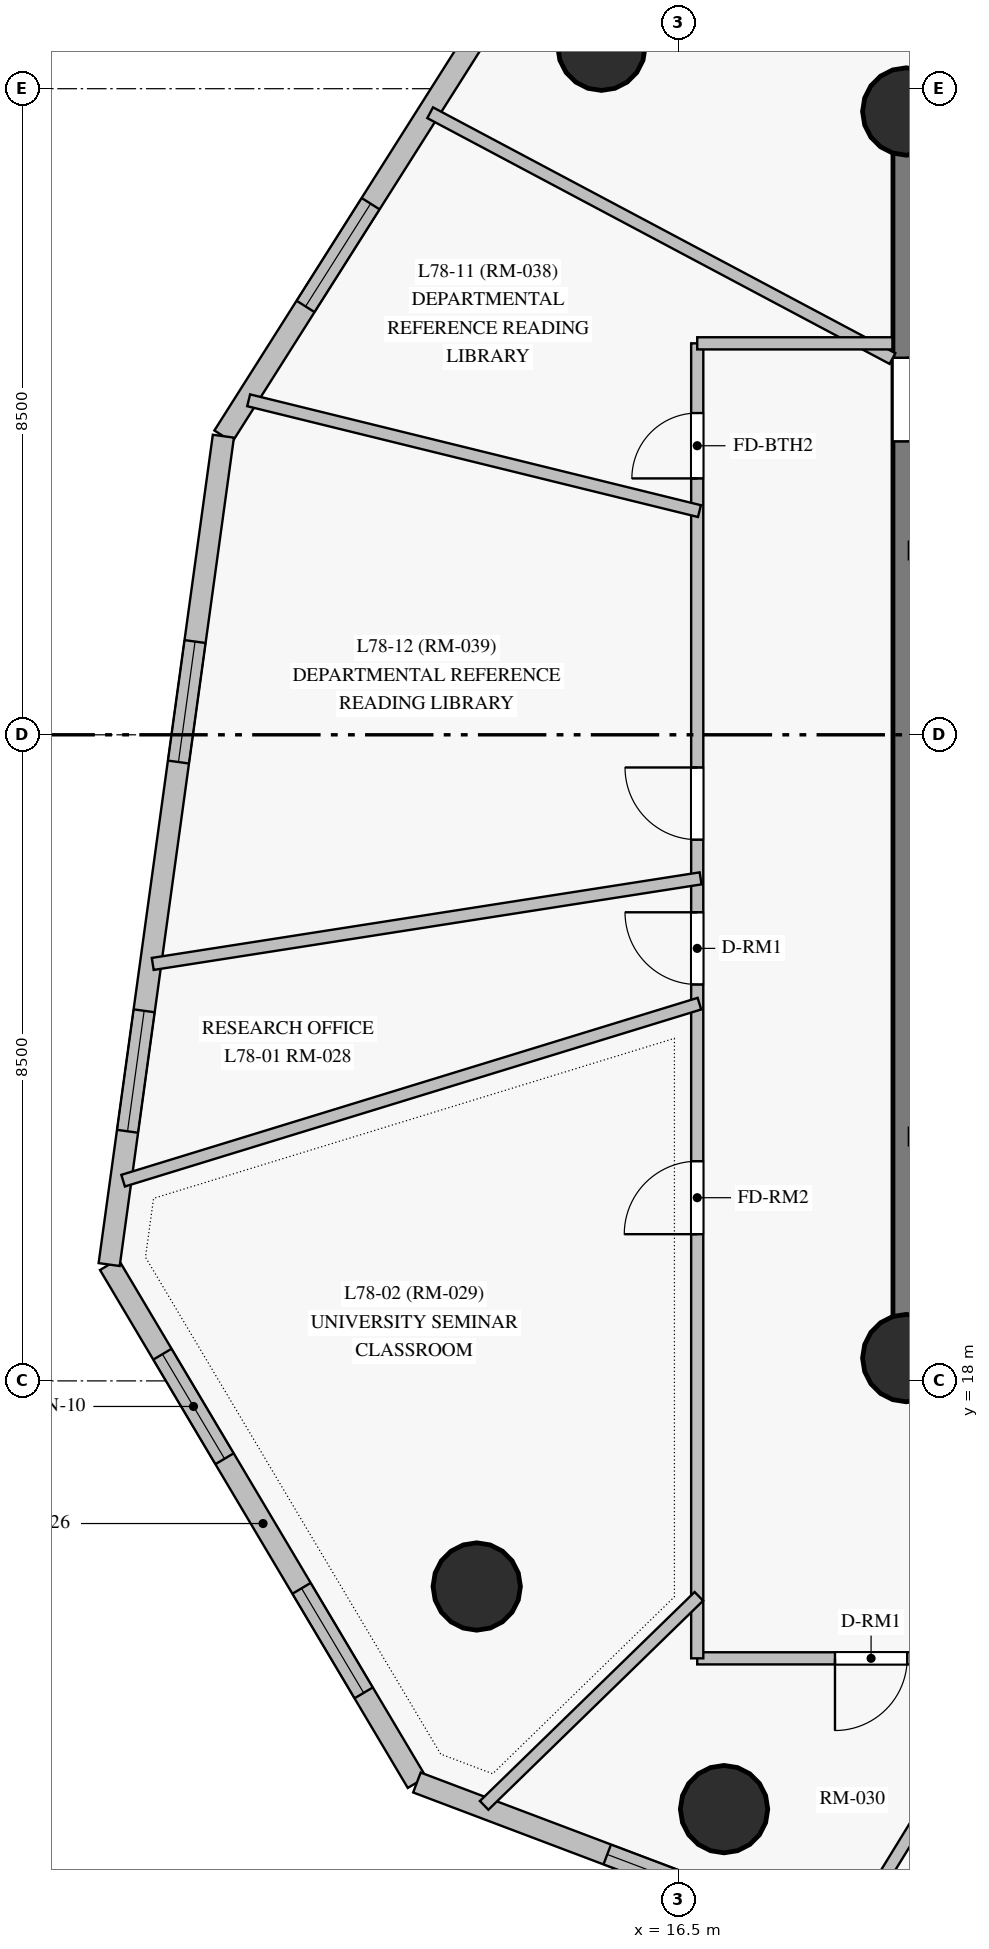
"""IFC4 building model, lengths in metres.
Left out: names, types, materials, properties, quantities, classifications, styles, units other than length and angle.
Written with IfcOpenShell. Run it as: python <this file> out.ifc"""

import sys

from ifc_helpers import new_model, si_unit, direction, frame, frame_2d, origin, origin_with_axes, origin_2d, place, context, subcontext, project, spatial, rectangle, circle, extrude, source, transform, mapped, element, fill, save


model = new_model("IFC4")
c1 = context("Model", 3, precision=1e-05, world=origin(), true_north=direction((0.0, 1.0)))
c2 = subcontext(c1, "Body", "Model", "MODEL_VIEW")
j1 = project(units=[si_unit("LENGTHUNIT", "METRE"), si_unit("PLANEANGLEUNIT", "RADIAN")], contexts=[c1])
p1 = place(None, origin())
s1 = spatial("IfcSite", under=j1, at=p1, CompositionType="ELEMENT")
p2 = place(p1, origin())
s2 = spatial("IfcBuilding", under=s1, at=p2, CompositionType="ELEMENT")
p3 = place(p2, frame((0.0, 0.0, 262.65)))
s3 = spatial("IfcBuildingStorey", under=s2, at=p3, CompositionType="ELEMENT", Elevation=262.65)
p4 = place(p3, frame((19.5, 18.3, 0.0), z_axis=(0.0, 0.0, 1.0), x_axis=(1.0, 0.0, 0.0)))
e1 = element("IfcWall", 1, at=p4, inside=s3, PredefinedType="SHEAR", context=c2, shape_type="SweptSolid", body=[
    extrude(rectangle(XDim=7.05, YDim=0.35, at=frame_2d((3.525, 0.0))), origin(), (0.0, 0.0, 1.0), 2.85),
])
p5 = place(p4, frame((4.2, 0.0, 0.0)))
e2 = element("IfcOpeningElement", 2, at=p5, cuts=e1, PredefinedType="OPENING", context=c2, shape_type="SweptSolid", body=[
    extrude(rectangle(XDim=1.4, YDim=2.2, at=frame_2d((0.7, 1.1))), frame((0.0, 0.185, 0.0), z_axis=(0.0, -1.0, 0.0), x_axis=(1.0, 0.0, 0.0)), (0.0, 0.0, 1.0), 0.37),
])
p6 = place(p3, frame((26.55, 34.7, 0.0), z_axis=(0.0, 0.0, 1.0), x_axis=(-1.0, 0.0, 0.0)))
e3 = element("IfcWall", 3, at=p6, inside=s3, PredefinedType="SHEAR", context=c2, shape_type="SweptSolid", body=[
    extrude(rectangle(XDim=7.05, YDim=0.35, at=frame_2d((3.525, 0.0))), origin(), (0.0, 0.0, 1.0), 2.85),
])
p7 = place(p3, frame((19.5, 34.7, 0.0), z_axis=(0.0, 0.0, 1.0), x_axis=(0.0, -1.0, 0.0)))
e4 = element("IfcWall", 4, at=p7, inside=s3, PredefinedType="SHEAR", context=c2, shape_type="SweptSolid", body=[
    extrude(rectangle(XDim=16.4, YDim=0.35, at=frame_2d((8.2, 0.0))), origin(), (0.0, 0.0, 1.0), 2.85),
])
p8 = place(p7, frame((3.24, 0.0, 0.0)))
e5 = element("IfcOpeningElement", 5, at=p8, cuts=e4, PredefinedType="OPENING", context=c2, shape_type="SweptSolid", body=[
    extrude(rectangle(XDim=1.1, YDim=2.15, at=frame_2d((0.55, 1.075))), frame((0.0, 0.185, 0.0), z_axis=(0.0, -1.0, 0.0), x_axis=(1.0, 0.0, 0.0)), (0.0, 0.0, 1.0), 0.37),
])
m1 = source(origin_with_axes(), c2, "Body", "SweptSolid", [
    extrude(circle(Radius=0.575, at=origin_2d()), origin(), (0.0, 0.0, 1.0), 3.05),
])
for number, where, z_axis, x_axis in (
    (6, (19.5, 18.3, 0.0), (0.0, 0.0, 1.0), (1.0, 0.0, 0.0)),
    (7, (19.5, 34.7, 0.0), (0.0, 0.0, 1.0), (1.0, 0.0, 0.0)),
    (8, (15.49, 35.552, 0.0), (0.0, 0.0, 1.0), (1.0, 0.0, 0.0)),
    (9, (13.849, 15.295, 0.0), (0.0, 0.0, 1.0), (1.0, 0.0, 0.0)),
    (10, (17.103, 12.366, 0.0), (0.0, 0.0, 1.0), (1.0, 0.0, 0.0)),
):
    element("IfcColumn", number, at=place(p3, frame(where, z_axis=z_axis, x_axis=x_axis)), inside=s3, PredefinedType="COLUMN", context=c2, shape_type="MappedRepresentation", body=[
        mapped(m1, transform((0.0, 0.0, 0.0), scale=1.0)),
    ])
p9 = place(p3, frame((9.013, 19.531, 0.0), z_axis=(0.0, 0.0, 1.0), x_axis=(0.510844736395, -0.859672993235, 0.0)))
e11 = element("IfcWall", 11, at=p9, inside=s3, PredefinedType="SOLIDWALL", context=c2, shape_type="SweptSolid", body=[
    extrude(rectangle(XDim=7.926, YDim=0.28, at=frame_2d((3.963, 0.0))), origin(), (0.0, 0.0, 1.0), 2.85),
])
p10 = place(p9, frame((1.372, 0.0, 0.85)))
e12 = element("IfcOpeningElement", 12, at=p10, cuts=e11, PredefinedType="OPENING", context=c2, shape_type="SweptSolid", body=[
    extrude(rectangle(XDim=1.6, YDim=1.6, at=frame_2d((0.8, 0.8))), frame((0.0, 0.15, 0.0), z_axis=(0.0, -1.0, 0.0), x_axis=(1.0, 0.0, 0.0)), (0.0, 0.0, 1.0), 0.3),
])
p11 = place(p9, frame((4.955, 0.0, 0.85)))
e13 = element("IfcOpeningElement", 13, at=p11, cuts=e11, PredefinedType="OPENING", context=c2, shape_type="SweptSolid", body=[
    extrude(rectangle(XDim=1.6, YDim=1.6, at=frame_2d((0.8, 0.8))), frame((0.0, 0.15, 0.0), z_axis=(0.0, -1.0, 0.0), x_axis=(1.0, 0.0, 0.0)), (0.0, 0.0, 1.0), 0.3),
])
p12 = place(p3, frame((13.062, 12.717, 0.0), z_axis=(0.0, 0.0, 1.0), x_axis=(0.935383697979, -0.353634468844, 0.0)))
e14 = element("IfcWall", 14, at=p12, inside=s3, PredefinedType="SOLIDWALL", context=c2, shape_type="SweptSolid", body=[
    extrude(rectangle(XDim=11.001, YDim=0.28, at=frame_2d((5.5, 0.0))), origin(), (0.0, 0.0, 1.0), 2.85),
])
p13 = place(p12, frame((2.677, 0.0, 0.85)))
e15 = element("IfcOpeningElement", 15, at=p13, cuts=e14, PredefinedType="OPENING", context=c2, shape_type="SweptSolid", body=[
    extrude(rectangle(XDim=1.6, YDim=1.6, at=frame_2d((0.8, 0.8))), frame((0.0, 0.15, 0.0), z_axis=(0.0, -1.0, 0.0), x_axis=(1.0, 0.0, 0.0)), (0.0, 0.0, 1.0), 0.3),
])
p14 = place(p12, frame((7.673, 0.0, 0.85)))
e16 = element("IfcOpeningElement", 16, at=p14, cuts=e14, PredefinedType="OPENING", context=c2, shape_type="SweptSolid", body=[
    extrude(rectangle(XDim=1.6, YDim=1.6, at=frame_2d((0.8, 0.8))), frame((0.0, 0.15, 0.0), z_axis=(0.0, -1.0, 0.0), x_axis=(1.0, 0.0, 0.0)), (0.0, 0.0, 1.0), 0.3),
])
p15 = place(p3, frame((15.207, 37.836, 0.0), z_axis=(0.0, 0.0, 1.0), x_axis=(-0.535025582322, -0.844835857585, 0.0)))
e17 = element("IfcWall", 17, at=p15, inside=s3, PredefinedType="SOLIDWALL", context=c2, shape_type="SweptSolid", body=[
    extrude(rectangle(XDim=8.768, YDim=0.28, at=frame_2d((4.384, 0.0))), origin(), (0.0, 0.0, 1.0), 2.85),
])
p16 = place(p15, frame((1.087, 0.0, 0.85)))
e18 = element("IfcOpeningElement", 18, at=p16, cuts=e17, PredefinedType="OPENING", context=c2, shape_type="SweptSolid", body=[
    extrude(rectangle(XDim=1.6, YDim=1.6, at=frame_2d((0.8, 0.8))), frame((0.0, 0.15, 0.0), z_axis=(0.0, -1.0, 0.0), x_axis=(1.0, 0.0, 0.0)), (0.0, 0.0, 1.0), 0.3),
])
p17 = place(p15, frame((5.147, 0.0, 0.85)))
e19 = element("IfcOpeningElement", 19, at=p17, cuts=e17, PredefinedType="OPENING", context=c2, shape_type="SweptSolid", body=[
    extrude(rectangle(XDim=1.6, YDim=1.6, at=frame_2d((0.8, 0.8))), frame((0.0, 0.15, 0.0), z_axis=(0.0, -1.0, 0.0), x_axis=(1.0, 0.0, 0.0)), (0.0, 0.0, 1.0), 0.3),
])
p18 = place(p3, frame((10.516, 30.428, 0.0), z_axis=(0.0, 0.0, 1.0), x_axis=(-0.136594591716, -0.990627032497, 0.0)))
e20 = element("IfcWall", 20, at=p18, inside=s3, PredefinedType="SOLIDWALL", context=c2, shape_type="SweptSolid", body=[
    extrude(rectangle(XDim=11.001, YDim=0.28, at=frame_2d((5.5, 0.0))), origin(), (0.0, 0.0, 1.0), 2.85),
])
p19 = place(p18, frame((2.727, 0.0, 0.85)))
e21 = element("IfcOpeningElement", 21, at=p19, cuts=e20, PredefinedType="OPENING", context=c2, shape_type="SweptSolid", body=[
    extrude(rectangle(XDim=1.6, YDim=1.6, at=frame_2d((0.8, 0.8))), frame((0.0, 0.15, 0.0), z_axis=(0.0, -1.0, 0.0), x_axis=(1.0, 0.0, 0.0)), (0.0, 0.0, 1.0), 0.3),
])
p20 = place(p18, frame((7.631, 0.0, 0.85)))
e22 = element("IfcOpeningElement", 22, at=p20, cuts=e20, PredefinedType="OPENING", context=c2, shape_type="SweptSolid", body=[
    extrude(rectangle(XDim=1.6, YDim=1.6, at=frame_2d((0.8, 0.8))), frame((0.0, 0.15, 0.0), z_axis=(0.0, -1.0, 0.0), x_axis=(1.0, 0.0, 0.0)), (0.0, 0.0, 1.0), 0.3),
])
p21 = place(p3, frame((41.821, 14.35, 0.0), z_axis=(0.0, 0.0, 1.0), x_axis=(-1.0, 0.0, 0.0)))
e23 = element("IfcWall", 23, at=p21, inside=s3, PredefinedType="PARTITIONING", context=c2, shape_type="SweptSolid", body=[
    extrude(rectangle(XDim=25.071, YDim=0.16, at=frame_2d((12.536, 0.0))), origin(), (0.0, 0.0, 1.0), 2.3),
])
p22 = place(p21, frame((22.309, 0.0, 0.0)))
e24 = element("IfcOpeningElement", 24, at=p22, cuts=e23, PredefinedType="OPENING", context=c2, shape_type="SweptSolid", body=[
    extrude(rectangle(XDim=0.95, YDim=2.15, at=frame_2d((0.475, 1.075))), frame((0.0, 0.09, 0.0), z_axis=(0.0, -1.0, 0.0), x_axis=(1.0, 0.0, 0.0)), (0.0, 0.0, 1.0), 0.18),
])
p23 = place(p21, frame((15.665, 0.0, 0.0)))
e25 = element("IfcOpeningElement", 25, at=p23, cuts=e23, PredefinedType="OPENING", context=c2, shape_type="SweptSolid", body=[
    extrude(rectangle(XDim=0.95, YDim=2.15, at=frame_2d((0.475, 1.075))), frame((0.0, 0.09, 0.0), z_axis=(0.0, -1.0, 0.0), x_axis=(1.0, 0.0, 0.0)), (0.0, 0.0, 1.0), 0.18),
])
p24 = place(p21, frame((11.94, 0.0, 0.0)))
e26 = element("IfcOpeningElement", 26, at=p24, cuts=e23, PredefinedType="OPENING", context=c2, shape_type="SweptSolid", body=[
    extrude(rectangle(XDim=0.95, YDim=2.15, at=frame_2d((0.475, 1.075))), frame((0.0, 0.09, 0.0), z_axis=(0.0, -1.0, 0.0), x_axis=(1.0, 0.0, 0.0)), (0.0, 0.0, 1.0), 0.18),
])
p25 = place(p3, frame((16.75, 14.35, 0.0), z_axis=(0.0, 0.0, 1.0), x_axis=(0.0, 1.0, 0.0)))
e27 = element("IfcWall", 27, at=p25, inside=s3, PredefinedType="PARTITIONING", context=c2, shape_type="SweptSolid", body=[
    extrude(rectangle(XDim=17.3, YDim=0.16, at=frame_2d((8.65, 0.0))), origin(), (0.0, 0.0, 1.0), 2.45),
])
p26 = place(p25, frame((8.865, 0.0, 0.0)))
e28 = element("IfcOpeningElement", 28, at=p26, cuts=e27, PredefinedType="OPENING", context=c2, shape_type="SweptSolid", body=[
    extrude(rectangle(XDim=0.95, YDim=2.15, at=frame_2d((0.475, 1.075))), frame((0.0, 0.09, 0.0), z_axis=(0.0, -1.0, 0.0), x_axis=(1.0, 0.0, 0.0)), (0.0, 0.0, 1.0), 0.18),
])
p27 = place(p25, frame((5.58, 0.0, 0.0)))
e29 = element("IfcOpeningElement", 29, at=p27, cuts=e27, PredefinedType="OPENING", context=c2, shape_type="SweptSolid", body=[
    extrude(rectangle(XDim=0.96, YDim=2.15, at=frame_2d((0.48, 1.075))), frame((0.0, 0.09, 0.0), z_axis=(0.0, -1.0, 0.0), x_axis=(1.0, 0.0, 0.0)), (0.0, 0.0, 1.0), 0.18),
])
p28 = place(p25, frame((10.77, 0.0, 0.0)))
e30 = element("IfcOpeningElement", 30, at=p28, cuts=e27, PredefinedType="OPENING", context=c2, shape_type="SweptSolid", body=[
    extrude(rectangle(XDim=0.95, YDim=2.15, at=frame_2d((0.475, 1.075))), frame((0.0, 0.09, 0.0), z_axis=(0.0, -1.0, 0.0), x_axis=(1.0, 0.0, 0.0)), (0.0, 0.0, 1.0), 0.18),
])
p29 = place(p25, frame((15.523, 0.0, 0.0)))
e31 = element("IfcOpeningElement", 31, at=p29, cuts=e27, PredefinedType="OPENING", context=c2, shape_type="SweptSolid", body=[
    extrude(rectangle(XDim=0.86, YDim=2.04, at=frame_2d((0.43, 1.02))), frame((0.0, 0.09, 0.0), z_axis=(0.0, -1.0, 0.0), x_axis=(1.0, 0.0, 0.0)), (0.0, 0.0, 1.0), 0.18),
])
p30 = place(p3, frame((16.779, 22.963, 0.0), z_axis=(0.0, 0.0, 1.0), x_axis=(-0.955923312873, -0.293616450332, 0.0)))
e32 = element("IfcWall", 32, at=p30, inside=s3, PredefinedType="PARTITIONING", context=c2, shape_type="SweptSolid", body=[
    extrude(rectangle(XDim=7.932, YDim=0.16, at=frame_2d((3.966, 0.0))), origin(), (0.0, 0.0, 1.0), 2.85),
])
p31 = place(p3, frame((9.587, 23.486, 0.0), z_axis=(0.0, 0.0, 1.0), x_axis=(0.988027979501, 0.154274792897, 0.0)))
e33 = element("IfcWall", 33, at=p31, inside=s3, PredefinedType="PARTITIONING", context=c2, shape_type="SweptSolid", body=[
    extrude(rectangle(XDim=7.295, YDim=0.16, at=frame_2d((3.648, 0.0))), origin(), (0.0, 0.0, 1.0), 2.85),
])
p32 = place(p3, frame((19.319, 31.45, 0.0), z_axis=(0.0, 0.0, 1.0), x_axis=(-0.882939910426, 0.469486011055, 0.0)))
e34 = element("IfcWall", 34, at=p32, inside=s3, PredefinedType="PARTITIONING", context=c2, shape_type="SweptSolid", body=[
    extrude(rectangle(XDim=6.889, YDim=0.16, at=frame_2d((3.444, 0.0))), origin(), (0.0, 0.0, 1.0), 2.85),
])
p33 = place(p3, frame((16.779, 29.443, 0.0), z_axis=(0.0, 0.0, 1.0), x_axis=(-0.971094330937, 0.238696041908, 0.0)))
e35 = element("IfcWall", 35, at=p33, inside=s3, PredefinedType="PARTITIONING", context=c2, shape_type="SweptSolid", body=[
    extrude(rectangle(XDim=6.107, YDim=0.16, at=frame_2d((3.054, 0.0))), origin(), (0.0, 0.0, 1.0), 2.85),
])
p34 = place(p3, frame((20.988, 14.375, 0.0), z_axis=(0.0, 0.0, 1.0), x_axis=(-0.52315433161, -0.852237962847, 0.0)))
e36 = element("IfcWall", 36, at=p34, inside=s3, PredefinedType="PARTITIONING", context=c2, shape_type="SweptSolid", body=[
    extrude(rectangle(XDim=4.407, YDim=0.16, at=frame_2d((2.203, 0.0))), origin(), (0.0, 0.0, 1.0), 2.85),
])
p35 = place(p3, frame((16.771, 15.165, 0.0), z_axis=(0.0, 0.0, 1.0), x_axis=(-0.716518431259, -0.697568159871, 0.0)))
e37 = element("IfcWall", 37, at=p35, inside=s3, PredefinedType="PARTITIONING", context=c2, shape_type="SweptSolid", body=[
    extrude(rectangle(XDim=3.942, YDim=0.16, at=frame_2d((1.971, 0.0))), origin(), (0.0, 0.0, 1.0), 2.85),
])
p36 = place(p3, frame((16.75, 31.65, 0.0), z_axis=(0.0, 0.0, 1.0), x_axis=(1.0, 0.0, 0.0)))
e38 = element("IfcWall", 38, at=p36, inside=s3, PredefinedType="PARTITIONING", context=c2, shape_type="SweptSolid", body=[
    extrude(rectangle(XDim=2.568, YDim=0.16, at=frame_2d((1.284, 0.0))), origin(), (0.0, 0.0, 1.0), 2.85),
])
m2 = source(origin_with_axes(), c2, "Body", "SweptSolid", [
    extrude(rectangle(XDim=1.6, YDim=1.6, at=frame_2d((0.8, 0.8))), frame((0.0, 0.03, 0.0), z_axis=(0.0, -1.0, 0.0), x_axis=(1.0, 0.0, 0.0)), (0.0, 0.0, 1.0), 0.06),
])
p37 = place(p10, origin())
e39 = element("IfcWindow", 39, at=p37, inside=s3, PartitioningType="SINGLE_PANEL", PredefinedType="WINDOW", context=c2, shape_type="MappedRepresentation", body=[
    mapped(m2, transform((0.0, 0.0, 0.0), scale=1.0)),
])
fill(e12, e39)
p38 = place(p11, origin())
e40 = element("IfcWindow", 40, at=p38, inside=s3, PartitioningType="SINGLE_PANEL", PredefinedType="WINDOW", context=c2, shape_type="MappedRepresentation", body=[
    mapped(m2, transform((0.0, 0.0, 0.0), scale=1.0)),
])
fill(e13, e40)
p39 = place(p13, origin())
e41 = element("IfcWindow", 41, at=p39, inside=s3, PartitioningType="SINGLE_PANEL", PredefinedType="WINDOW", context=c2, shape_type="MappedRepresentation", body=[
    mapped(m2, transform((0.0, 0.0, 0.0), scale=1.0)),
])
fill(e15, e41)
p40 = place(p17, origin())
e42 = element("IfcWindow", 42, at=p40, inside=s3, PartitioningType="SINGLE_PANEL", PredefinedType="WINDOW", context=c2, shape_type="MappedRepresentation", body=[
    mapped(m2, transform((0.0, 0.0, 0.0), scale=1.0)),
])
fill(e19, e42)
p41 = place(p19, origin())
e43 = element("IfcWindow", 43, at=p41, inside=s3, PartitioningType="SINGLE_PANEL", PredefinedType="WINDOW", context=c2, shape_type="MappedRepresentation", body=[
    mapped(m2, transform((0.0, 0.0, 0.0), scale=1.0)),
])
fill(e21, e43)
p42 = place(p20, origin())
e44 = element("IfcWindow", 44, at=p42, inside=s3, PartitioningType="SINGLE_PANEL", PredefinedType="WINDOW", context=c2, shape_type="MappedRepresentation", body=[
    mapped(m2, transform((0.0, 0.0, 0.0), scale=1.0)),
])
fill(e22, e44)
m3 = source(origin_with_axes(), c2, "Body", "SweptSolid", [
    extrude(rectangle(XDim=1.1, YDim=2.15, at=frame_2d((0.55, 1.075))), frame((0.0, 0.025, 0.0), z_axis=(0.0, -1.0, 0.0), x_axis=(1.0, 0.0, 0.0)), (0.0, 0.0, 1.0), 0.05),
])
p43 = place(p8, origin())
e45 = element("IfcDoor", 45, at=p43, inside=s3, OperationType="SINGLE_SWING_LEFT", PredefinedType="DOOR", context=c2, shape_type="MappedRepresentation", body=[
    mapped(m3, transform((0.0, 0.0, 0.0), scale=1.0)),
])
fill(e5, e45)
m4 = source(origin_with_axes(), c2, "Body", "SweptSolid", [
    extrude(rectangle(XDim=0.95, YDim=2.15, at=frame_2d((0.475, 1.075))), frame((0.0, 0.025, 0.0), z_axis=(0.0, -1.0, 0.0), x_axis=(1.0, 0.0, 0.0)), (0.0, 0.0, 1.0), 0.05),
])
p44 = place(p26, origin())
e46 = element("IfcDoor", 46, at=p44, inside=s3, OperationType="SINGLE_SWING_RIGHT", PredefinedType="DOOR", context=c2, shape_type="MappedRepresentation", body=[
    mapped(m4, transform((0.0, 0.0, 0.0), scale=1.0)),
])
fill(e28, e46)
m5 = source(origin_with_axes(), c2, "Body", "SweptSolid", [
    extrude(rectangle(XDim=0.96, YDim=2.15, at=frame_2d((0.48, 1.075))), frame((0.0, 0.025, 0.0), z_axis=(0.0, -1.0, 0.0), x_axis=(1.0, 0.0, 0.0)), (0.0, 0.0, 1.0), 0.05),
])
p45 = place(p27, origin())
e47 = element("IfcDoor", 47, at=p45, inside=s3, OperationType="SINGLE_SWING_LEFT", PredefinedType="DOOR", context=c2, shape_type="MappedRepresentation", body=[
    mapped(m5, transform((0.0, 0.0, 0.0), scale=1.0)),
])
fill(e29, e47)
p46 = place(p22, origin())
e48 = element("IfcDoor", 48, at=p46, inside=s3, OperationType="SINGLE_SWING_RIGHT", PredefinedType="DOOR", context=c2, shape_type="MappedRepresentation", body=[
    mapped(m4, transform((0.0, 0.0, 0.0), scale=1.0)),
])
fill(e24, e48)
p47 = place(p28, origin())
e49 = element("IfcDoor", 49, at=p47, inside=s3, OperationType="SINGLE_SWING_RIGHT", PredefinedType="DOOR", context=c2, shape_type="MappedRepresentation", body=[
    mapped(m4, transform((0.0, 0.0, 0.0), scale=1.0)),
])
fill(e30, e49)
m6 = source(origin_with_axes(), c2, "Body", "SweptSolid", [
    extrude(rectangle(XDim=0.86, YDim=2.04, at=frame_2d((0.43, 1.02))), frame((0.0, 0.025, 0.0), z_axis=(0.0, -1.0, 0.0), x_axis=(1.0, 0.0, 0.0)), (0.0, 0.0, 1.0), 0.05),
])
p48 = place(p29, origin())
e50 = element("IfcDoor", 50, at=p48, inside=s3, OperationType="SINGLE_SWING_LEFT", PredefinedType="DOOR", context=c2, shape_type="MappedRepresentation", body=[
    mapped(m6, transform((0.0, 0.0, 0.0), scale=1.0)),
])
fill(e31, e50)
save(model, sys.argv[1])
